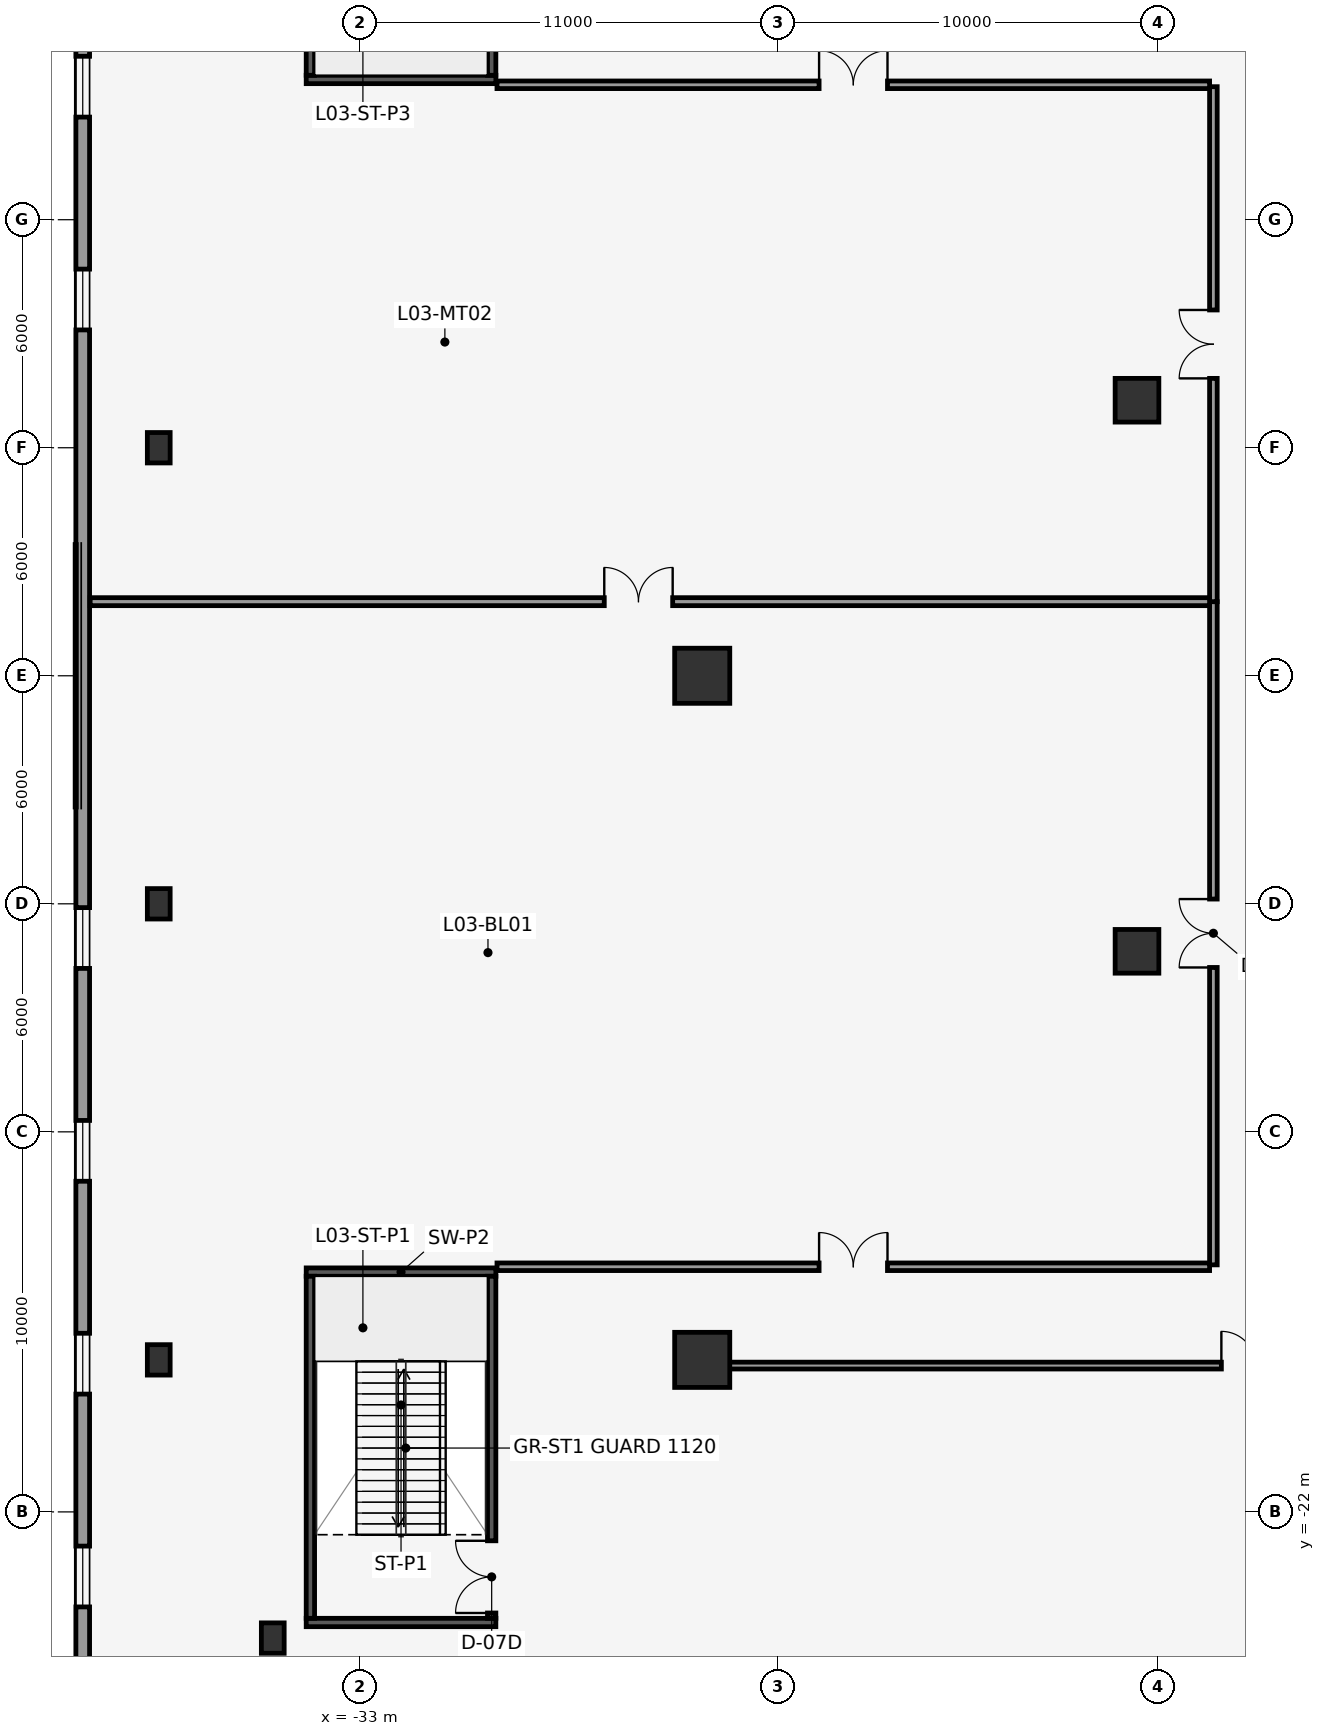
"""IFC4 building model, lengths in metres.
Left out: names, types, materials, properties, quantities, classifications, styles, units other than length and angle.
Written with IfcOpenShell. Run it as: python <this file> out.ifc"""

import sys

from ifc_helpers import new_model, si_unit, direction, frame, frame_2d, origin, origin_2d, place, context, subcontext, project, spatial, rectangle, hollow_rectangle, extrude, element, fill, save


model = new_model("IFC4")
c1 = context("Model", 3, precision=1e-05, world=origin(), true_north=direction((0.0, 1.0)))
c2 = subcontext(c1, "Body", "Model", "MODEL_VIEW")
j1 = project(units=[si_unit("LENGTHUNIT", "METRE"), si_unit("PLANEANGLEUNIT", "RADIAN")], contexts=[c1])
p1 = place(None, origin())
s1 = spatial("IfcSite", under=j1, at=p1, CompositionType="ELEMENT")
p2 = place(p1, origin())
s2 = spatial("IfcBuilding", under=s1, at=p2, CompositionType="ELEMENT")
p3 = place(p2, frame((0.0, 0.0, 17.5)))
s3 = spatial("IfcBuildingStorey", under=s2, at=p3, CompositionType="ELEMENT", Elevation=17.5)
for number, where, z_axis, x_axis in (
    (1, (-12.56, -7.25, 0.0), (0.0, 0.0, 1.0), (1.0, 0.0, 0.0)),
    (2, (-12.56, 7.25, 0.0), (0.0, 0.0, 1.0), (1.0, 0.0, 0.0)),
):
    element("IfcColumn", number, at=place(p3, frame(where, z_axis=z_axis, x_axis=x_axis)), inside=s3, PredefinedType="COLUMN", context=c2, shape_type="SweptSolid", body=[
        extrude(rectangle(XDim=1.15, YDim=1.15, at=origin_2d()), origin(), (0.0, 0.0, 1.0), 6.0),
    ])
for number, where, z_axis, x_axis in (
    (3, (-24.0, -18.0, 0.0), (0.0, 0.0, 1.0), (1.0, 0.0, 0.0)),
    (4, (-24.0, 0.0, 0.0), (0.0, 0.0, 1.0), (1.0, 0.0, 0.0)),
):
    element("IfcColumn", number, at=place(p3, frame(where, z_axis=z_axis, x_axis=x_axis)), inside=s3, PredefinedType="COLUMN", context=c2, shape_type="SweptSolid", body=[
        extrude(rectangle(XDim=1.45, YDim=1.45, at=origin_2d()), origin(), (0.0, 0.0, 1.0), 6.0),
    ])
for number, where, z_axis, x_axis in (
    (5, (-38.3, -18.0, 0.0), (0.0, 0.0, 1.0), (1.0, 0.0, 0.0)),
    (6, (-38.3, -6.0, 0.0), (0.0, 0.0, 1.0), (1.0, 0.0, 0.0)),
    (7, (-38.3, 6.0, 0.0), (0.0, 0.0, 1.0), (1.0, 0.0, 0.0)),
    (8, (-35.3, -25.32, 0.0), (0.0, 0.0, 1.0), (1.0, 0.0, 0.0)),
):
    element("IfcColumn", number, at=place(p3, frame(where, z_axis=z_axis, x_axis=x_axis)), inside=s3, PredefinedType="COLUMN", context=c2, shape_type="SweptSolid", body=[
        extrude(hollow_rectangle(XDim=0.6, YDim=0.8, WallThickness=0.05, at=origin_2d()), origin(), (0.0, 0.0, 1.0), 6.0),
    ])
p4 = place(p3, frame((-40.3, -29.3, 0.0), z_axis=(0.0, 0.0, 1.0), x_axis=(0.0, 1.0, 0.0)))
e9 = element("IfcWall", 9, at=p4, inside=s3, PredefinedType="STANDARD", context=c2, shape_type="SweptSolid", body=[
    extrude(rectangle(XDim=58.6, YDim=0.36, at=frame_2d((29.3, 0.0))), origin(), (0.0, 0.0, 1.0), 5.7),
])
p5 = place(p4, frame((4.8, 0.0, 0.9)))
e10 = element("IfcOpeningElement", 10, at=p5, cuts=e9, PredefinedType="OPENING", context=c2, shape_type="SweptSolid", body=[
    extrude(rectangle(XDim=1.6, YDim=2.6, at=frame_2d((0.8, 1.3))), frame((0.0, 0.19, 0.0), z_axis=(0.0, -1.0, 0.0), x_axis=(1.0, 0.0, 0.0)), (0.0, 0.0, 1.0), 0.38),
])
p6 = place(p4, frame((10.4, 0.0, 0.9)))
e11 = element("IfcOpeningElement", 11, at=p6, cuts=e9, PredefinedType="OPENING", context=c2, shape_type="SweptSolid", body=[
    extrude(rectangle(XDim=1.6, YDim=2.6, at=frame_2d((0.8, 1.3))), frame((0.0, 0.19, 0.0), z_axis=(0.0, -1.0, 0.0), x_axis=(1.0, 0.0, 0.0)), (0.0, 0.0, 1.0), 0.38),
])
p7 = place(p4, frame((16.0, 0.0, 0.9)))
e12 = element("IfcOpeningElement", 12, at=p7, cuts=e9, PredefinedType="OPENING", context=c2, shape_type="SweptSolid", body=[
    extrude(rectangle(XDim=1.6, YDim=2.6, at=frame_2d((0.8, 1.3))), frame((0.0, 0.19, 0.0), z_axis=(0.0, -1.0, 0.0), x_axis=(1.0, 0.0, 0.0)), (0.0, 0.0, 1.0), 0.38),
])
p8 = place(p4, frame((21.6, 0.0, 0.9)))
e13 = element("IfcOpeningElement", 13, at=p8, cuts=e9, PredefinedType="OPENING", context=c2, shape_type="SweptSolid", body=[
    extrude(rectangle(XDim=1.6, YDim=2.6, at=frame_2d((0.8, 1.3))), frame((0.0, 0.19, 0.0), z_axis=(0.0, -1.0, 0.0), x_axis=(1.0, 0.0, 0.0)), (0.0, 0.0, 1.0), 0.38),
])
p9 = place(p4, frame((38.4, 0.0, 0.9)))
e14 = element("IfcOpeningElement", 14, at=p9, cuts=e9, PredefinedType="OPENING", context=c2, shape_type="SweptSolid", body=[
    extrude(rectangle(XDim=1.6, YDim=2.6, at=frame_2d((0.8, 1.3))), frame((0.0, 0.19, 0.0), z_axis=(0.0, -1.0, 0.0), x_axis=(1.0, 0.0, 0.0)), (0.0, 0.0, 1.0), 0.38),
])
p10 = place(p4, frame((44.0, 0.0, 0.9)))
e15 = element("IfcOpeningElement", 15, at=p10, cuts=e9, PredefinedType="OPENING", context=c2, shape_type="SweptSolid", body=[
    extrude(rectangle(XDim=1.6, YDim=2.6, at=frame_2d((0.8, 1.3))), frame((0.0, 0.19, 0.0), z_axis=(0.0, -1.0, 0.0), x_axis=(1.0, 0.0, 0.0)), (0.0, 0.0, 1.0), 0.38),
])
p11 = place(p4, frame((49.6, 0.0, 0.9)))
e16 = element("IfcOpeningElement", 16, at=p11, cuts=e9, PredefinedType="OPENING", context=c2, shape_type="SweptSolid", body=[
    extrude(rectangle(XDim=1.6, YDim=2.6, at=frame_2d((0.8, 1.3))), frame((0.0, 0.19, 0.0), z_axis=(0.0, -1.0, 0.0), x_axis=(1.0, 0.0, 0.0)), (0.0, 0.0, 1.0), 0.38),
])
for number, where, z_axis, x_axis in (
    (17, (-34.42, -24.91, 0.0), (0.0, 0.0, 1.0), (1.0, 0.0, 0.0)),
    (18, (-34.42, -15.69, 0.0), (0.0, 0.0, 1.0), (1.0, 0.0, 0.0)),
):
    element("IfcWall", number, at=place(p3, frame(where, z_axis=z_axis, x_axis=x_axis)), inside=s3, PredefinedType="SHEAR", context=c2, shape_type="SweptSolid", body=[
        extrude(rectangle(XDim=4.99, YDim=0.22, at=frame_2d((2.495, 0.0))), origin(), (0.0, 0.0, 1.0), 5.7),
    ])
p12 = place(p3, frame((-34.31, -24.8, 0.0), z_axis=(0.0, 0.0, 1.0), x_axis=(0.0, 1.0, 0.0)))
e19 = element("IfcWall", 19, at=p12, inside=s3, PredefinedType="SHEAR", context=c2, shape_type="SweptSolid", body=[
    extrude(rectangle(XDim=9.0, YDim=0.22, at=frame_2d((4.5, 0.0))), origin(), (0.0, 0.0, 1.0), 5.7),
])
p13 = place(p3, frame((-29.54, -24.8, 0.0), z_axis=(0.0, 0.0, 1.0), x_axis=(0.0, 1.0, 0.0)))
e20 = element("IfcWall", 20, at=p13, inside=s3, PredefinedType="SHEAR", context=c2, shape_type="SweptSolid", body=[
    extrude(rectangle(XDim=9.0, YDim=0.22, at=frame_2d((4.5, 0.0))), origin(), (0.0, 0.0, 1.0), 5.7),
])
p14 = place(p13, frame((0.14, 0.0, 0.0)))
e21 = element("IfcOpeningElement", 21, at=p14, cuts=e20, PredefinedType="OPENING", context=c2, shape_type="SweptSolid", body=[
    extrude(rectangle(XDim=1.9, YDim=2.2, at=frame_2d((0.95, 1.1))), frame((0.0, 0.12, 0.0), z_axis=(0.0, -1.0, 0.0), x_axis=(1.0, 0.0, 0.0)), (0.0, 0.0, 1.0), 0.24),
])
p15 = place(p3, frame((-34.42, 15.69, 0.0), z_axis=(0.0, 0.0, 1.0), x_axis=(1.0, 0.0, 0.0)))
e22 = element("IfcWall", 22, at=p15, inside=s3, PredefinedType="SHEAR", context=c2, shape_type="SweptSolid", body=[
    extrude(rectangle(XDim=4.99, YDim=0.22, at=frame_2d((2.495, 0.0))), origin(), (0.0, 0.0, 1.0), 5.7),
])
p16 = place(p3, frame((-34.31, 15.8, 0.0), z_axis=(0.0, 0.0, 1.0), x_axis=(0.0, 1.0, 0.0)))
e23 = element("IfcWall", 23, at=p16, inside=s3, PredefinedType="SHEAR", context=c2, shape_type="SweptSolid", body=[
    extrude(rectangle(XDim=9.0, YDim=0.22, at=frame_2d((4.5, 0.0))), origin(), (0.0, 0.0, 1.0), 5.7),
])
p17 = place(p3, frame((-29.54, 15.8, 0.0), z_axis=(0.0, 0.0, 1.0), x_axis=(0.0, 1.0, 0.0)))
e24 = element("IfcWall", 24, at=p17, inside=s3, PredefinedType="SHEAR", context=c2, shape_type="SweptSolid", body=[
    extrude(rectangle(XDim=9.0, YDim=0.22, at=frame_2d((4.5, 0.0))), origin(), (0.0, 0.0, 1.0), 5.7),
])
p18 = place(p17, frame((6.96, 0.0, 0.0)))
e25 = element("IfcOpeningElement", 25, at=p18, cuts=e24, PredefinedType="OPENING", context=c2, shape_type="SweptSolid", body=[
    extrude(rectangle(XDim=1.9, YDim=2.2, at=frame_2d((0.95, 1.1))), frame((0.0, 0.12, 0.0), z_axis=(0.0, -1.0, 0.0), x_axis=(1.0, 0.0, 0.0)), (0.0, 0.0, 1.0), 0.24),
])
p19 = place(p3, frame((-10.55, -15.5, 0.0), z_axis=(0.0, 0.0, 1.0), x_axis=(0.0, 1.0, 0.0)))
e26 = element("IfcWall", 26, at=p19, inside=s3, PredefinedType="PARTITIONING", context=c2, shape_type="SweptSolid", body=[
    extrude(rectangle(XDim=17.45, YDim=0.2, at=frame_2d((8.725, 0.0))), origin(), (0.0, 0.0, 1.0), 5.7),
])
p20 = place(p19, frame((7.825, 0.0, 0.0)))
e27 = element("IfcOpeningElement", 27, at=p20, cuts=e26, PredefinedType="OPENING", context=c2, shape_type="SweptSolid", body=[
    extrude(rectangle(XDim=1.8, YDim=2.2, at=frame_2d((0.9, 1.1))), frame((0.0, 0.11, 0.0), z_axis=(0.0, -1.0, 0.0), x_axis=(1.0, 0.0, 0.0)), (0.0, 0.0, 1.0), 0.22),
])
p21 = place(p3, frame((-10.55, 1.95, 0.0), z_axis=(0.0, 0.0, 1.0), x_axis=(0.0, 1.0, 0.0)))
e28 = element("IfcWall", 28, at=p21, inside=s3, PredefinedType="PARTITIONING", context=c2, shape_type="SweptSolid", body=[
    extrude(rectangle(XDim=13.55, YDim=0.2, at=frame_2d((6.775, 0.0))), origin(), (0.0, 0.0, 1.0), 5.7),
])
p22 = place(p21, frame((5.875, 0.0, 0.0)))
e29 = element("IfcOpeningElement", 29, at=p22, cuts=e28, PredefinedType="OPENING", context=c2, shape_type="SweptSolid", body=[
    extrude(rectangle(XDim=1.8, YDim=2.2, at=frame_2d((0.9, 1.1))), frame((0.0, 0.11, 0.0), z_axis=(0.0, -1.0, 0.0), x_axis=(1.0, 0.0, 0.0)), (0.0, 0.0, 1.0), 0.22),
])
p23 = place(p3, frame((-40.105, 1.95, 0.0), z_axis=(0.0, 0.0, 1.0), x_axis=(1.0, 0.0, 0.0)))
e30 = element("IfcWall", 30, at=p23, inside=s3, PredefinedType="MOVABLE", context=c2, shape_type="SweptSolid", body=[
    extrude(rectangle(XDim=29.455, YDim=0.21, at=frame_2d((14.728, 0.0))), origin(), (0.0, 0.0, 1.0), 5.7),
])
p24 = place(p23, frame((13.528, 0.0, 0.0)))
e31 = element("IfcOpeningElement", 31, at=p24, cuts=e30, PredefinedType="OPENING", context=c2, shape_type="SweptSolid", body=[
    extrude(rectangle(XDim=1.8, YDim=2.2, at=frame_2d((0.9, 1.1))), frame((0.0, 0.115, 0.0), z_axis=(0.0, -1.0, 0.0), x_axis=(1.0, 0.0, 0.0)), (0.0, 0.0, 1.0), 0.23),
])
p25 = place(p3, frame((-29.4, 15.55, 0.0), z_axis=(0.0, 0.0, 1.0), x_axis=(1.0, 0.0, 0.0)))
e32 = element("IfcWall", 32, at=p25, inside=s3, PredefinedType="PARTITIONING", context=c2, shape_type="SweptSolid", body=[
    extrude(rectangle(XDim=18.75, YDim=0.2, at=frame_2d((9.375, 0.0))), origin(), (0.0, 0.0, 1.0), 5.7),
])
p26 = place(p25, frame((8.475, 0.0, 0.0)))
e33 = element("IfcOpeningElement", 33, at=p26, cuts=e32, PredefinedType="OPENING", context=c2, shape_type="SweptSolid", body=[
    extrude(rectangle(XDim=1.8, YDim=2.2, at=frame_2d((0.9, 1.1))), frame((0.0, 0.11, 0.0), z_axis=(0.0, -1.0, 0.0), x_axis=(1.0, 0.0, 0.0)), (0.0, 0.0, 1.0), 0.22),
])
p27 = place(p3, frame((-29.4, -15.55, 0.0), z_axis=(0.0, 0.0, 1.0), x_axis=(1.0, 0.0, 0.0)))
e34 = element("IfcWall", 34, at=p27, inside=s3, PredefinedType="PARTITIONING", context=c2, shape_type="SweptSolid", body=[
    extrude(rectangle(XDim=18.75, YDim=0.2, at=frame_2d((9.375, 0.0))), origin(), (0.0, 0.0, 1.0), 5.7),
])
p28 = place(p27, frame((8.475, 0.0, 0.0)))
e35 = element("IfcOpeningElement", 35, at=p28, cuts=e34, PredefinedType="OPENING", context=c2, shape_type="SweptSolid", body=[
    extrude(rectangle(XDim=1.8, YDim=2.2, at=frame_2d((0.9, 1.1))), frame((0.0, 0.11, 0.0), z_axis=(0.0, -1.0, 0.0), x_axis=(1.0, 0.0, 0.0)), (0.0, 0.0, 1.0), 0.22),
])
p29 = place(p3, frame((-23.6, -18.15, 0.0), z_axis=(0.0, 0.0, 1.0), x_axis=(1.0, 0.0, 0.0)))
e36 = element("IfcWall", 36, at=p29, inside=s3, PredefinedType="PARTITIONING", context=c2, shape_type="SweptSolid", body=[
    extrude(rectangle(XDim=47.2, YDim=0.18, at=frame_2d((23.6, 0.0))), origin(), (0.0, 0.0, 1.0), 3.88),
])
p30 = place(p29, frame((13.26, 0.0, 0.0)))
e37 = element("IfcOpeningElement", 37, at=p30, cuts=e36, PredefinedType="OPENING", context=c2, shape_type="SweptSolid", body=[
    extrude(rectangle(XDim=1.8, YDim=2.2, at=frame_2d((0.9, 1.1))), frame((0.0, 0.1, 0.0), z_axis=(0.0, -1.0, 0.0), x_axis=(1.0, 0.0, 0.0)), (0.0, 0.0, 1.0), 0.2),
])
p31 = place(p5, origin())
e38 = element("IfcWindow", 38, at=p31, inside=s3, PartitioningType="DOUBLE_PANEL_VERTICAL", PredefinedType="WINDOW", context=c2, shape_type="SweptSolid", body=[
    extrude(rectangle(XDim=1.6, YDim=2.6, at=frame_2d((0.8, 1.3))), frame((0.0, 0.03, 0.0), z_axis=(0.0, -1.0, 0.0), x_axis=(1.0, 0.0, 0.0)), (0.0, 0.0, 1.0), 0.06),
])
fill(e10, e38)
p32 = place(p6, origin())
e39 = element("IfcWindow", 39, at=p32, inside=s3, PartitioningType="DOUBLE_PANEL_VERTICAL", PredefinedType="WINDOW", context=c2, shape_type="SweptSolid", body=[
    extrude(rectangle(XDim=1.6, YDim=2.6, at=frame_2d((0.8, 1.3))), frame((0.0, 0.03, 0.0), z_axis=(0.0, -1.0, 0.0), x_axis=(1.0, 0.0, 0.0)), (0.0, 0.0, 1.0), 0.06),
])
fill(e11, e39)
p33 = place(p7, origin())
e40 = element("IfcWindow", 40, at=p33, inside=s3, PartitioningType="DOUBLE_PANEL_VERTICAL", PredefinedType="WINDOW", context=c2, shape_type="SweptSolid", body=[
    extrude(rectangle(XDim=1.6, YDim=2.6, at=frame_2d((0.8, 1.3))), frame((0.0, 0.03, 0.0), z_axis=(0.0, -1.0, 0.0), x_axis=(1.0, 0.0, 0.0)), (0.0, 0.0, 1.0), 0.06),
])
fill(e12, e40)
p34 = place(p8, origin())
e41 = element("IfcWindow", 41, at=p34, inside=s3, PartitioningType="DOUBLE_PANEL_VERTICAL", PredefinedType="WINDOW", context=c2, shape_type="SweptSolid", body=[
    extrude(rectangle(XDim=1.6, YDim=2.6, at=frame_2d((0.8, 1.3))), frame((0.0, 0.03, 0.0), z_axis=(0.0, -1.0, 0.0), x_axis=(1.0, 0.0, 0.0)), (0.0, 0.0, 1.0), 0.06),
])
fill(e13, e41)
p35 = place(p9, origin())
e42 = element("IfcWindow", 42, at=p35, inside=s3, PartitioningType="DOUBLE_PANEL_VERTICAL", PredefinedType="WINDOW", context=c2, shape_type="SweptSolid", body=[
    extrude(rectangle(XDim=1.6, YDim=2.6, at=frame_2d((0.8, 1.3))), frame((0.0, 0.03, 0.0), z_axis=(0.0, -1.0, 0.0), x_axis=(1.0, 0.0, 0.0)), (0.0, 0.0, 1.0), 0.06),
])
fill(e14, e42)
p36 = place(p10, origin())
e43 = element("IfcWindow", 43, at=p36, inside=s3, PartitioningType="DOUBLE_PANEL_VERTICAL", PredefinedType="WINDOW", context=c2, shape_type="SweptSolid", body=[
    extrude(rectangle(XDim=1.6, YDim=2.6, at=frame_2d((0.8, 1.3))), frame((0.0, 0.03, 0.0), z_axis=(0.0, -1.0, 0.0), x_axis=(1.0, 0.0, 0.0)), (0.0, 0.0, 1.0), 0.06),
])
fill(e15, e43)
p37 = place(p14, origin())
e44 = element("IfcDoor", 44, at=p37, inside=s3, OperationType="DOUBLE_DOOR_SINGLE_SWING", PredefinedType="DOOR", context=c2, shape_type="SweptSolid", body=[
    extrude(rectangle(XDim=1.9, YDim=2.2, at=frame_2d((0.95, 1.1))), frame((0.0, 0.025, 0.0), z_axis=(0.0, -1.0, 0.0), x_axis=(1.0, 0.0, 0.0)), (0.0, 0.0, 1.0), 0.05),
])
fill(e21, e44)
p38 = place(p20, origin())
e45 = element("IfcDoor", 45, at=p38, inside=s3, OperationType="DOUBLE_DOOR_SINGLE_SWING", PredefinedType="DOOR", context=c2, shape_type="SweptSolid", body=[
    extrude(rectangle(XDim=1.8, YDim=2.2, at=frame_2d((0.9, 1.1))), frame((0.0, 0.025, 0.0), z_axis=(0.0, -1.0, 0.0), x_axis=(1.0, 0.0, 0.0)), (0.0, 0.0, 1.0), 0.05),
])
fill(e27, e45)
p39 = place(p22, origin())
e46 = element("IfcDoor", 46, at=p39, inside=s3, OperationType="DOUBLE_DOOR_SINGLE_SWING", PredefinedType="DOOR", context=c2, shape_type="SweptSolid", body=[
    extrude(rectangle(XDim=1.8, YDim=2.2, at=frame_2d((0.9, 1.1))), frame((0.0, 0.025, 0.0), z_axis=(0.0, -1.0, 0.0), x_axis=(1.0, 0.0, 0.0)), (0.0, 0.0, 1.0), 0.05),
])
fill(e29, e46)
p40 = place(p24, origin())
e47 = element("IfcDoor", 47, at=p40, inside=s3, OperationType="DOUBLE_DOOR_SINGLE_SWING", PredefinedType="DOOR", context=c2, shape_type="SweptSolid", body=[
    extrude(rectangle(XDim=1.8, YDim=2.2, at=frame_2d((0.9, 1.1))), frame((0.0, 0.025, 0.0), z_axis=(0.0, -1.0, 0.0), x_axis=(1.0, 0.0, 0.0)), (0.0, 0.0, 1.0), 0.05),
])
fill(e31, e47)
p41 = place(p26, origin())
e48 = element("IfcDoor", 48, at=p41, inside=s3, OperationType="DOUBLE_DOOR_SINGLE_SWING", PredefinedType="DOOR", context=c2, shape_type="SweptSolid", body=[
    extrude(rectangle(XDim=1.8, YDim=2.2, at=frame_2d((0.9, 1.1))), frame((0.0, 0.025, 0.0), z_axis=(0.0, -1.0, 0.0), x_axis=(1.0, 0.0, 0.0)), (0.0, 0.0, 1.0), 0.05),
])
fill(e33, e48)
p42 = place(p28, origin())
e49 = element("IfcDoor", 49, at=p42, inside=s3, OperationType="DOUBLE_DOOR_SINGLE_SWING", PredefinedType="DOOR", context=c2, shape_type="SweptSolid", body=[
    extrude(rectangle(XDim=1.8, YDim=2.2, at=frame_2d((0.9, 1.1))), frame((0.0, 0.025, 0.0), z_axis=(0.0, -1.0, 0.0), x_axis=(1.0, 0.0, 0.0)), (0.0, 0.0, 1.0), 0.05),
])
fill(e35, e49)
p43 = place(p30, origin())
e50 = element("IfcDoor", 50, at=p43, inside=s3, OperationType="DOUBLE_DOOR_SINGLE_SWING", PredefinedType="DOOR", context=c2, shape_type="SweptSolid", body=[
    extrude(rectangle(XDim=1.8, YDim=2.2, at=frame_2d((0.9, 1.1))), frame((0.0, 0.025, 0.0), z_axis=(0.0, -1.0, 0.0), x_axis=(1.0, 0.0, 0.0)), (0.0, 0.0, 1.0), 0.05),
])
fill(e37, e50)
save(model, sys.argv[1])
